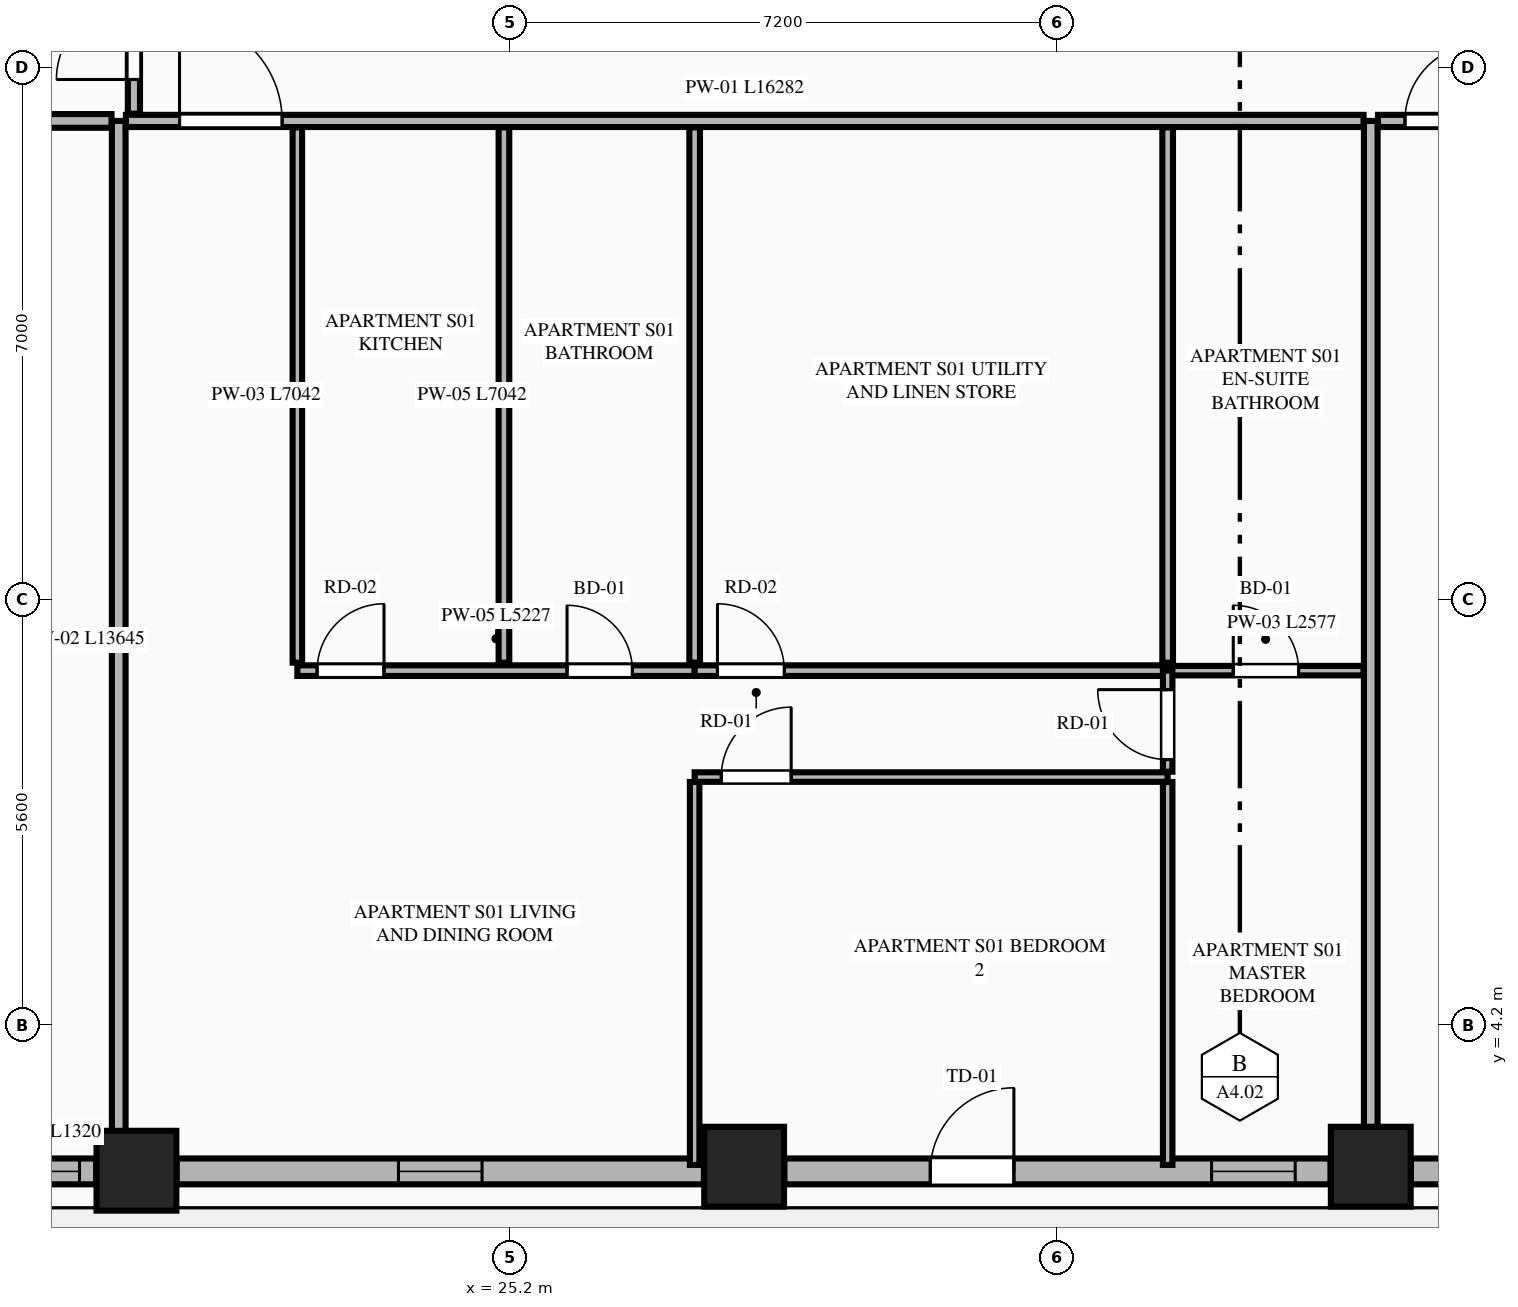
"""IFC4 building model, lengths in metres.
Left out: names, types, materials, properties, quantities, classifications, styles, units other than length and angle.
Written with IfcOpenShell. Run it as: python <this file> out.ifc"""

import sys

from ifc_helpers import new_model, si_unit, direction, frame, frame_2d, origin, origin_2d, place, context, subcontext, project, spatial, rectangle, extrude, element, fill, save


model = new_model("IFC4")
c1 = context("Model", 3, precision=1e-05, world=origin(), true_north=direction((0.0, 1.0)))
c2 = subcontext(c1, "Body", "Model", "MODEL_VIEW")
j1 = project(units=[si_unit("LENGTHUNIT", "METRE"), si_unit("PLANEANGLEUNIT", "RADIAN")], contexts=[c1])
p1 = place(None, origin())
s1 = spatial("IfcSite", under=j1, at=p1, CompositionType="ELEMENT")
p2 = place(p1, origin())
s2 = spatial("IfcBuilding", under=s1, at=p2, CompositionType="ELEMENT")
p3 = place(p2, frame((0.0, 0.0, 87.1)))
s3 = spatial("IfcBuildingStorey", under=s2, at=p3, CompositionType="ELEMENT", Elevation=87.1)
for number, where, z_axis, x_axis in (
    (1, (20.283, 2.289, 0.0), (0.0, 0.0, 1.0), (1.0, 0.0, 0.0)),
    (2, (28.278, 2.342, 0.0), (0.0, 0.0, 1.0), (1.0, 0.0, 0.0)),
    (3, (36.522, 2.342, 0.0), (0.0, 0.0, 1.0), (1.0, 0.0, 0.0)),
):
    element("IfcColumn", number, at=place(p3, frame(where, z_axis=z_axis, x_axis=x_axis)), inside=s3, PredefinedType="COLUMN", context=c2, shape_type="SweptSolid", body=[
        extrude(rectangle(XDim=1.05, YDim=1.05, at=origin_2d()), origin(), (0.0, 0.0, 1.0), 3.55),
    ])
p4 = place(p3, frame((18.434, 2.28, 0.0), z_axis=(0.0, 0.0, 1.0), x_axis=(1.0, 0.0, 0.0)))
e4 = element("IfcWall", 4, at=p4, inside=s3, PredefinedType="STANDARD", context=c2, shape_type="SweptSolid", body=[
    extrude(rectangle(XDim=1.32, YDim=0.34, at=frame_2d((0.66, 0.0))), origin(), (0.0, 0.0, 1.0), 3.33),
])
p5 = place(p4, frame((0.22, 0.0, 0.75)))
e5 = element("IfcOpeningElement", 5, at=p5, cuts=e4, PredefinedType="OPENING", context=c2, shape_type="SweptSolid", body=[
    extrude(rectangle(XDim=0.88, YDim=2.0, at=frame_2d((0.44, 1.0))), frame((0.0, 0.18, 0.0), z_axis=(0.0, -1.0, 0.0), x_axis=(1.0, 0.0, 0.0)), (0.0, 0.0, 1.0), 0.36),
])
p6 = place(p3, frame((20.812, 2.28, 0.0), z_axis=(0.0, 0.0, 1.0), x_axis=(1.0, 0.0, 0.0)))
e6 = element("IfcWall", 6, at=p6, inside=s3, PredefinedType="STANDARD", context=c2, shape_type="SweptSolid", body=[
    extrude(rectangle(XDim=6.937, YDim=0.34, at=frame_2d((3.469, 0.0))), origin(), (0.0, 0.0, 1.0), 2.787),
])
p7 = place(p6, frame((2.918, 0.0, 0.75)))
e7 = element("IfcOpeningElement", 7, at=p7, cuts=e6, PredefinedType="OPENING", context=c2, shape_type="SweptSolid", body=[
    extrude(rectangle(XDim=1.1, YDim=1.887, at=frame_2d((0.55, 0.943))), frame((0.0, 0.18, 0.0), z_axis=(0.0, -1.0, 0.0), x_axis=(1.0, 0.0, 0.0)), (0.0, 0.0, 1.0), 0.36),
])
p8 = place(p3, frame((28.807, 2.28, 0.0), z_axis=(0.0, 0.0, 1.0), x_axis=(1.0, 0.0, 0.0)))
e8 = element("IfcWall", 8, at=p8, inside=s3, PredefinedType="STANDARD", context=c2, shape_type="SweptSolid", body=[
    extrude(rectangle(XDim=7.186, YDim=0.34, at=frame_2d((3.593, 0.0))), origin(), (0.0, 0.0, 1.0), 2.787),
])
p9 = place(p8, frame((1.92, 0.0, 0.0)))
e9 = element("IfcOpeningElement", 9, at=p9, cuts=e8, PredefinedType="OPENING", context=c2, shape_type="SweptSolid", body=[
    extrude(rectangle(XDim=1.1, YDim=2.25, at=frame_2d((0.55, 1.125))), frame((0.0, 0.18, 0.0), z_axis=(0.0, -1.0, 0.0), x_axis=(1.0, 0.0, 0.0)), (0.0, 0.0, 1.0), 0.36),
])
p10 = place(p8, frame((5.621, 0.0, 0.75)))
e10 = element("IfcOpeningElement", 10, at=p10, cuts=e8, PredefinedType="OPENING", context=c2, shape_type="SweptSolid", body=[
    extrude(rectangle(XDim=1.1, YDim=1.887, at=frame_2d((0.55, 0.943))), frame((0.0, 0.18, 0.0), z_axis=(0.0, -1.0, 0.0), x_axis=(1.0, 0.0, 0.0)), (0.0, 0.0, 1.0), 0.36),
])
p11 = place(p3, frame((37.051, 2.28, 0.0), z_axis=(0.0, 0.0, 1.0), x_axis=(1.0, 0.0, 0.0)))
e11 = element("IfcWall", 11, at=p11, inside=s3, PredefinedType="STANDARD", context=c2, shape_type="SweptSolid", body=[
    extrude(rectangle(XDim=6.937, YDim=0.34, at=frame_2d((3.469, 0.0))), origin(), (0.0, 0.0, 1.0), 2.787),
])
p12 = place(p11, frame((2.918, 0.0, 0.75)))
e12 = element("IfcOpeningElement", 12, at=p12, cuts=e11, PredefinedType="OPENING", context=c2, shape_type="SweptSolid", body=[
    extrude(rectangle(XDim=1.1, YDim=1.887, at=frame_2d((0.55, 0.943))), frame((0.0, 0.18, 0.0), z_axis=(0.0, -1.0, 0.0), x_axis=(1.0, 0.0, 0.0)), (0.0, 0.0, 1.0), 0.36),
])
p13 = place(p3, frame((20.05, 2.455, 0.0), z_axis=(0.0, 0.0, 1.0), x_axis=(0.0, 1.0, 0.0)))
e13 = element("IfcWall", 13, at=p13, inside=s3, PredefinedType="PARTITIONING", context=c2, shape_type="SweptSolid", body=[
    extrude(rectangle(XDim=13.645, YDim=0.18, at=frame_2d((6.823, 0.0))), origin(), (0.0, 0.0, 1.0), 3.33),
])
p14 = place(p3, frame((36.522, 2.455, 0.0), z_axis=(0.0, 0.0, 1.0), x_axis=(0.0, 1.0, 0.0)))
e14 = element("IfcWall", 14, at=p14, inside=s3, PredefinedType="PARTITIONING", context=c2, shape_type="SweptSolid", body=[
    extrude(rectangle(XDim=13.645, YDim=0.18, at=frame_2d((6.823, 0.0))), origin(), (0.0, 0.0, 1.0), 2.7),
])
p15 = place(p3, frame((20.145, 16.1, 0.0), z_axis=(0.0, 0.0, 1.0), x_axis=(1.0, 0.0, 0.0)))
e15 = element("IfcWall", 15, at=p15, inside=s3, PredefinedType="PARTITIONING", context=c2, shape_type="SweptSolid", body=[
    extrude(rectangle(XDim=16.282, YDim=0.16, at=frame_2d((8.141, 0.0))), origin(), (0.0, 0.0, 1.0), 3.33),
])
p16 = place(p15, frame((0.705, 0.0, 0.0)))
e16 = element("IfcOpeningElement", 16, at=p16, cuts=e15, PredefinedType="OPENING", context=c2, shape_type="SweptSolid", body=[
    extrude(rectangle(XDim=1.35, YDim=2.35, at=frame_2d((0.675, 1.175))), frame((0.0, 0.09, 0.0), z_axis=(0.0, -1.0, 0.0), x_axis=(1.0, 0.0, 0.0)), (0.0, 0.0, 1.0), 0.18),
])
p17 = place(p3, frame((22.4, 8.973, 0.0), z_axis=(0.0, 0.0, 1.0), x_axis=(0.0, 1.0, 0.0)))
e17 = element("IfcWall", 17, at=p17, inside=s3, PredefinedType="PARTITIONING", context=c2, shape_type="SweptSolid", body=[
    extrude(rectangle(XDim=7.042, YDim=0.125, at=frame_2d((3.521, 0.0))), origin(), (0.0, 0.0, 1.0), 2.7),
])
p18 = place(p3, frame((22.4, 8.868, 0.0), z_axis=(0.0, 0.0, 1.0), x_axis=(1.0, 0.0, 0.0)))
e18 = element("IfcWall", 18, at=p18, inside=s3, PredefinedType="PLUMBINGWALL", context=c2, shape_type="SweptSolid", body=[
    extrude(rectangle(XDim=5.227, YDim=0.14, at=frame_2d((2.614, 0.0))), origin(), (0.0, 0.0, 1.0), 3.33),
])
p19 = place(p18, frame((3.548, 0.0, 0.0)))
e19 = element("IfcOpeningElement", 19, at=p19, cuts=e18, PredefinedType="OPENING", context=c2, shape_type="SweptSolid", body=[
    extrude(rectangle(XDim=0.86, YDim=2.1, at=frame_2d((0.43, 1.05))), frame((0.0, 0.08, 0.0), z_axis=(0.0, -1.0, 0.0), x_axis=(1.0, 0.0, 0.0)), (0.0, 0.0, 1.0), 0.16),
])
p20 = place(p18, frame((0.26, 0.0, 0.0)))
e20 = element("IfcOpeningElement", 20, at=p20, cuts=e18, PredefinedType="OPENING", context=c2, shape_type="SweptSolid", body=[
    extrude(rectangle(XDim=0.88, YDim=2.15, at=frame_2d((0.44, 1.075))), frame((0.0, 0.08, 0.0), z_axis=(0.0, -1.0, 0.0), x_axis=(1.0, 0.0, 0.0)), (0.0, 0.0, 1.0), 0.16),
])
p21 = place(p3, frame((27.627, 8.868, 0.0), z_axis=(0.0, 0.0, 1.0), x_axis=(1.0, 0.0, 0.0)))
e21 = element("IfcWall", 21, at=p21, inside=s3, PredefinedType="PLUMBINGWALL", context=c2, shape_type="SweptSolid", body=[
    extrude(rectangle(XDim=6.223, YDim=0.14, at=frame_2d((3.112, 0.0))), origin(), (0.0, 0.0, 1.0), 3.33),
])
p22 = place(p21, frame((0.3, 0.0, 0.0)))
e22 = element("IfcOpeningElement", 22, at=p22, cuts=e21, PredefinedType="OPENING", context=c2, shape_type="SweptSolid", body=[
    extrude(rectangle(XDim=0.88, YDim=2.15, at=frame_2d((0.44, 1.075))), frame((0.0, 0.08, 0.0), z_axis=(0.0, -1.0, 0.0), x_axis=(1.0, 0.0, 0.0)), (0.0, 0.0, 1.0), 0.16),
])
p23 = place(p3, frame((33.85, 8.868, 0.0), z_axis=(0.0, 0.0, 1.0), x_axis=(1.0, 0.0, 0.0)))
e23 = element("IfcWall", 23, at=p23, inside=s3, PredefinedType="PARTITIONING", context=c2, shape_type="SweptSolid", body=[
    extrude(rectangle(XDim=2.577, YDim=0.125, at=frame_2d((1.289, 0.0))), origin(), (0.0, 0.0, 1.0), 3.33),
])
p24 = place(p23, frame((0.863, 0.0, 0.0)))
e24 = element("IfcOpeningElement", 24, at=p24, cuts=e23, PredefinedType="OPENING", context=c2, shape_type="SweptSolid", body=[
    extrude(rectangle(XDim=0.86, YDim=2.1, at=frame_2d((0.43, 1.05))), frame((0.0, 0.073, 0.0), z_axis=(0.0, -1.0, 0.0), x_axis=(1.0, 0.0, 0.0)), (0.0, 0.0, 1.0), 0.145),
])
p25 = place(p3, frame((25.118, 8.973, 0.0), z_axis=(0.0, 0.0, 1.0), x_axis=(0.0, 1.0, 0.0)))
e25 = element("IfcWall", 25, at=p25, inside=s3, PredefinedType="PLUMBINGWALL", context=c2, shape_type="SweptSolid", body=[
    extrude(rectangle(XDim=7.042, YDim=0.14, at=frame_2d((3.521, 0.0))), origin(), (0.0, 0.0, 1.0), 3.33),
])
p26 = place(p3, frame((27.627, 2.365, 0.0), z_axis=(0.0, 0.0, 1.0), x_axis=(0.0, 1.0, 0.0)))
e26 = element("IfcWall", 26, at=p26, inside=s3, PredefinedType="PARTITIONING", context=c2, shape_type="SweptSolid", body=[
    extrude(rectangle(XDim=5.038, YDim=0.125, at=frame_2d((2.519, 0.0))), origin(), (0.0, 0.0, 1.0), 3.33),
])
p27 = place(p3, frame((27.627, 7.468, 0.0), z_axis=(0.0, 0.0, 1.0), x_axis=(1.0, 0.0, 0.0)))
e27 = element("IfcWall", 27, at=p27, inside=s3, PredefinedType="PARTITIONING", context=c2, shape_type="SweptSolid", body=[
    extrude(rectangle(XDim=6.223, YDim=0.125, at=frame_2d((3.112, 0.0))), origin(), (0.0, 0.0, 1.0), 3.33),
])
p28 = place(p27, frame((0.35, 0.0, 0.0)))
e28 = element("IfcOpeningElement", 28, at=p28, cuts=e27, PredefinedType="OPENING", context=c2, shape_type="SweptSolid", body=[
    extrude(rectangle(XDim=0.92, YDim=2.15, at=frame_2d((0.46, 1.075))), frame((0.0, 0.073, 0.0), z_axis=(0.0, -1.0, 0.0), x_axis=(1.0, 0.0, 0.0)), (0.0, 0.0, 1.0), 0.145),
])
p29 = place(p3, frame((33.85, 7.538, 0.0), z_axis=(0.0, 0.0, 1.0), x_axis=(0.0, 1.0, 0.0)))
e29 = element("IfcWall", 29, at=p29, inside=s3, PredefinedType="PARTITIONING", context=c2, shape_type="SweptSolid", body=[
    extrude(rectangle(XDim=1.33, YDim=0.125, at=frame_2d((0.665, 0.0))), origin(), (0.0, 0.0, 1.0), 3.33),
])
p30 = place(p29, frame((0.16, 0.0, 0.0)))
e30 = element("IfcOpeningElement", 30, at=p30, cuts=e29, PredefinedType="OPENING", context=c2, shape_type="SweptSolid", body=[
    extrude(rectangle(XDim=0.92, YDim=2.15, at=frame_2d((0.46, 1.075))), frame((0.0, 0.073, 0.0), z_axis=(0.0, -1.0, 0.0), x_axis=(1.0, 0.0, 0.0)), (0.0, 0.0, 1.0), 0.145),
])
for number, where, z_axis, x_axis in (
    (31, (27.627, 8.973, 0.0), (0.0, 0.0, 1.0), (0.0, 1.0, 0.0)),
    (32, (33.85, 8.973, 0.0), (0.0, 0.0, 1.0), (0.0, 1.0, 0.0)),
):
    element("IfcWall", number, at=place(p3, frame(where, z_axis=z_axis, x_axis=x_axis)), inside=s3, PredefinedType="PLUMBINGWALL", context=c2, shape_type="SweptSolid", body=[
        extrude(rectangle(XDim=7.042, YDim=0.14, at=frame_2d((3.521, 0.0))), origin(), (0.0, 0.0, 1.0), 3.33),
    ])
p31 = place(p3, frame((33.85, 2.365, 0.0), z_axis=(0.0, 0.0, 1.0), x_axis=(0.0, 1.0, 0.0)))
e33 = element("IfcWall", 33, at=p31, inside=s3, PredefinedType="PARTITIONING", context=c2, shape_type="SweptSolid", body=[
    extrude(rectangle(XDim=5.038, YDim=0.125, at=frame_2d((2.519, 0.0))), origin(), (0.0, 0.0, 1.0), 3.33),
])
p32 = place(p3, frame((36.617, 16.1, 0.0), z_axis=(0.0, 0.0, 1.0), x_axis=(1.0, 0.0, 0.0)))
e34 = element("IfcWall", 34, at=p32, inside=s3, PredefinedType="PARTITIONING", context=c2, shape_type="SweptSolid", body=[
    extrude(rectangle(XDim=8.038, YDim=0.16, at=frame_2d((4.019, 0.0))), origin(), (0.0, 0.0, 1.0), 3.33),
])
p33 = place(p32, frame((0.355, 0.0, 0.0)))
e35 = element("IfcOpeningElement", 35, at=p33, cuts=e34, PredefinedType="OPENING", context=c2, shape_type="SweptSolid", body=[
    extrude(rectangle(XDim=1.02, YDim=2.25, at=frame_2d((0.51, 1.125))), frame((0.0, 0.09, 0.0), z_axis=(0.0, -1.0, 0.0), x_axis=(1.0, 0.0, 0.0)), (0.0, 0.0, 1.0), 0.18),
])
p34 = place(p3, frame((10.488, 16.1, 0.0), z_axis=(0.0, 0.0, 1.0), x_axis=(1.0, 0.0, 0.0)))
e36 = element("IfcWall", 36, at=p34, inside=s3, PredefinedType="PARTITIONING", context=c2, shape_type="SweptSolid", body=[
    extrude(rectangle(XDim=9.467, YDim=0.18, at=frame_2d((4.733, 0.0))), origin(), (0.0, 0.0, 1.0), 3.33),
])
p35 = place(p3, frame((20.25, 16.195, 0.0), z_axis=(0.0, 0.0, 1.0), x_axis=(0.0, 1.0, 0.0)))
e37 = element("IfcWall", 37, at=p35, inside=s3, PredefinedType="PARTITIONING", context=c2, shape_type="SweptSolid", body=[
    extrude(rectangle(XDim=9.218, YDim=0.16, at=frame_2d((4.609, 0.0))), origin(), (0.0, 0.0, 1.0), 2.7),
])
p36 = place(p35, frame((0.45, 0.0, 0.0)))
e38 = element("IfcOpeningElement", 38, at=p36, cuts=e37, PredefinedType="OPENING", context=c2, shape_type="SweptSolid", body=[
    extrude(rectangle(XDim=1.02, YDim=2.25, at=frame_2d((0.51, 1.125))), frame((0.0, 0.09, 0.0), z_axis=(0.0, -1.0, 0.0), x_axis=(1.0, 0.0, 0.0)), (0.0, 0.0, 1.0), 0.18),
])
p37 = place(p7, origin())
e39 = element("IfcWindow", 39, at=p37, inside=s3, PartitioningType="SINGLE_PANEL", PredefinedType="WINDOW", context=c2, shape_type="SweptSolid", body=[
    extrude(rectangle(XDim=1.1, YDim=1.887, at=frame_2d((0.55, 0.943))), frame((0.0, 0.03, 0.0), z_axis=(0.0, -1.0, 0.0), x_axis=(1.0, 0.0, 0.0)), (0.0, 0.0, 1.0), 0.06),
])
fill(e7, e39)
p38 = place(p9, origin())
e40 = element("IfcDoor", 40, at=p38, inside=s3, OperationType="SINGLE_SWING_RIGHT", PredefinedType="DOOR", context=c2, shape_type="SweptSolid", body=[
    extrude(rectangle(XDim=1.1, YDim=2.25, at=frame_2d((0.55, 1.125))), frame((0.0, 0.025, 0.0), z_axis=(0.0, -1.0, 0.0), x_axis=(1.0, 0.0, 0.0)), (0.0, 0.0, 1.0), 0.05),
])
fill(e9, e40)
p39 = place(p19, origin())
e41 = element("IfcDoor", 41, at=p39, inside=s3, OperationType="SINGLE_SWING_LEFT", PredefinedType="DOOR", context=c2, shape_type="SweptSolid", body=[
    extrude(rectangle(XDim=0.86, YDim=2.1, at=frame_2d((0.43, 1.05))), frame((0.0, 0.025, 0.0), z_axis=(0.0, -1.0, 0.0), x_axis=(1.0, 0.0, 0.0)), (0.0, 0.0, 1.0), 0.05),
])
fill(e19, e41)
p40 = place(p24, origin())
e42 = element("IfcDoor", 42, at=p40, inside=s3, OperationType="SINGLE_SWING_LEFT", PredefinedType="DOOR", context=c2, shape_type="SweptSolid", body=[
    extrude(rectangle(XDim=0.86, YDim=2.1, at=frame_2d((0.43, 1.05))), frame((0.0, 0.025, 0.0), z_axis=(0.0, -1.0, 0.0), x_axis=(1.0, 0.0, 0.0)), (0.0, 0.0, 1.0), 0.05),
])
fill(e24, e42)
p41 = place(p16, origin())
e43 = element("IfcDoor", 43, at=p41, inside=s3, OperationType="SINGLE_SWING_LEFT", PredefinedType="DOOR", context=c2, shape_type="SweptSolid", body=[
    extrude(rectangle(XDim=1.35, YDim=2.35, at=frame_2d((0.675, 1.175))), frame((0.0, 0.025, 0.0), z_axis=(0.0, -1.0, 0.0), x_axis=(1.0, 0.0, 0.0)), (0.0, 0.0, 1.0), 0.05),
])
fill(e16, e43)
p42 = place(p20, origin())
e44 = element("IfcDoor", 44, at=p42, inside=s3, OperationType="SINGLE_SWING_RIGHT", PredefinedType="DOOR", context=c2, shape_type="SweptSolid", body=[
    extrude(rectangle(XDim=0.88, YDim=2.15, at=frame_2d((0.44, 1.075))), frame((0.0, 0.025, 0.0), z_axis=(0.0, -1.0, 0.0), x_axis=(1.0, 0.0, 0.0)), (0.0, 0.0, 1.0), 0.05),
])
fill(e20, e44)
p43 = place(p22, origin())
e45 = element("IfcDoor", 45, at=p43, inside=s3, OperationType="SINGLE_SWING_LEFT", PredefinedType="DOOR", context=c2, shape_type="SweptSolid", body=[
    extrude(rectangle(XDim=0.88, YDim=2.15, at=frame_2d((0.44, 1.075))), frame((0.0, 0.025, 0.0), z_axis=(0.0, -1.0, 0.0), x_axis=(1.0, 0.0, 0.0)), (0.0, 0.0, 1.0), 0.05),
])
fill(e22, e45)
p44 = place(p28, origin())
e46 = element("IfcDoor", 46, at=p44, inside=s3, OperationType="SINGLE_SWING_RIGHT", PredefinedType="DOOR", context=c2, shape_type="SweptSolid", body=[
    extrude(rectangle(XDim=0.92, YDim=2.15, at=frame_2d((0.46, 1.075))), frame((0.0, 0.025, 0.0), z_axis=(0.0, -1.0, 0.0), x_axis=(1.0, 0.0, 0.0)), (0.0, 0.0, 1.0), 0.05),
])
fill(e28, e46)
p45 = place(p30, origin())
e47 = element("IfcDoor", 47, at=p45, inside=s3, OperationType="SINGLE_SWING_RIGHT", PredefinedType="DOOR", context=c2, shape_type="SweptSolid", body=[
    extrude(rectangle(XDim=0.92, YDim=2.15, at=frame_2d((0.46, 1.075))), frame((0.0, 0.025, 0.0), z_axis=(0.0, -1.0, 0.0), x_axis=(1.0, 0.0, 0.0)), (0.0, 0.0, 1.0), 0.05),
])
fill(e30, e47)
p46 = place(p33, origin())
e48 = element("IfcDoor", 48, at=p46, inside=s3, OperationType="SINGLE_SWING_RIGHT", PredefinedType="DOOR", context=c2, shape_type="SweptSolid", body=[
    extrude(rectangle(XDim=1.02, YDim=2.25, at=frame_2d((0.51, 1.125))), frame((0.0, 0.025, 0.0), z_axis=(0.0, -1.0, 0.0), x_axis=(1.0, 0.0, 0.0)), (0.0, 0.0, 1.0), 0.05),
])
fill(e35, e48)
p47 = place(p36, origin())
e49 = element("IfcDoor", 49, at=p47, inside=s3, OperationType="SINGLE_SWING_LEFT", PredefinedType="DOOR", context=c2, shape_type="SweptSolid", body=[
    extrude(rectangle(XDim=1.02, YDim=2.25, at=frame_2d((0.51, 1.125))), frame((0.0, 0.025, 0.0), z_axis=(0.0, -1.0, 0.0), x_axis=(1.0, 0.0, 0.0)), (0.0, 0.0, 1.0), 0.05),
])
fill(e38, e49)
p48 = place(p5, origin())
e50 = element("IfcWindow", 50, at=p48, inside=s3, PartitioningType="SINGLE_PANEL", PredefinedType="WINDOW", context=c2, shape_type="SweptSolid", body=[
    extrude(rectangle(XDim=0.88, YDim=2.0, at=frame_2d((0.44, 1.0))), frame((0.0, 0.03, 0.0), z_axis=(0.0, -1.0, 0.0), x_axis=(1.0, 0.0, 0.0)), (0.0, 0.0, 1.0), 0.06),
])
fill(e5, e50)
p49 = place(p10, origin())
e51 = element("IfcWindow", 51, at=p49, inside=s3, PartitioningType="SINGLE_PANEL", PredefinedType="WINDOW", context=c2, shape_type="SweptSolid", body=[
    extrude(rectangle(XDim=1.1, YDim=1.887, at=frame_2d((0.55, 0.943))), frame((0.0, 0.03, 0.0), z_axis=(0.0, -1.0, 0.0), x_axis=(1.0, 0.0, 0.0)), (0.0, 0.0, 1.0), 0.06),
])
fill(e10, e51)
save(model, sys.argv[1])
